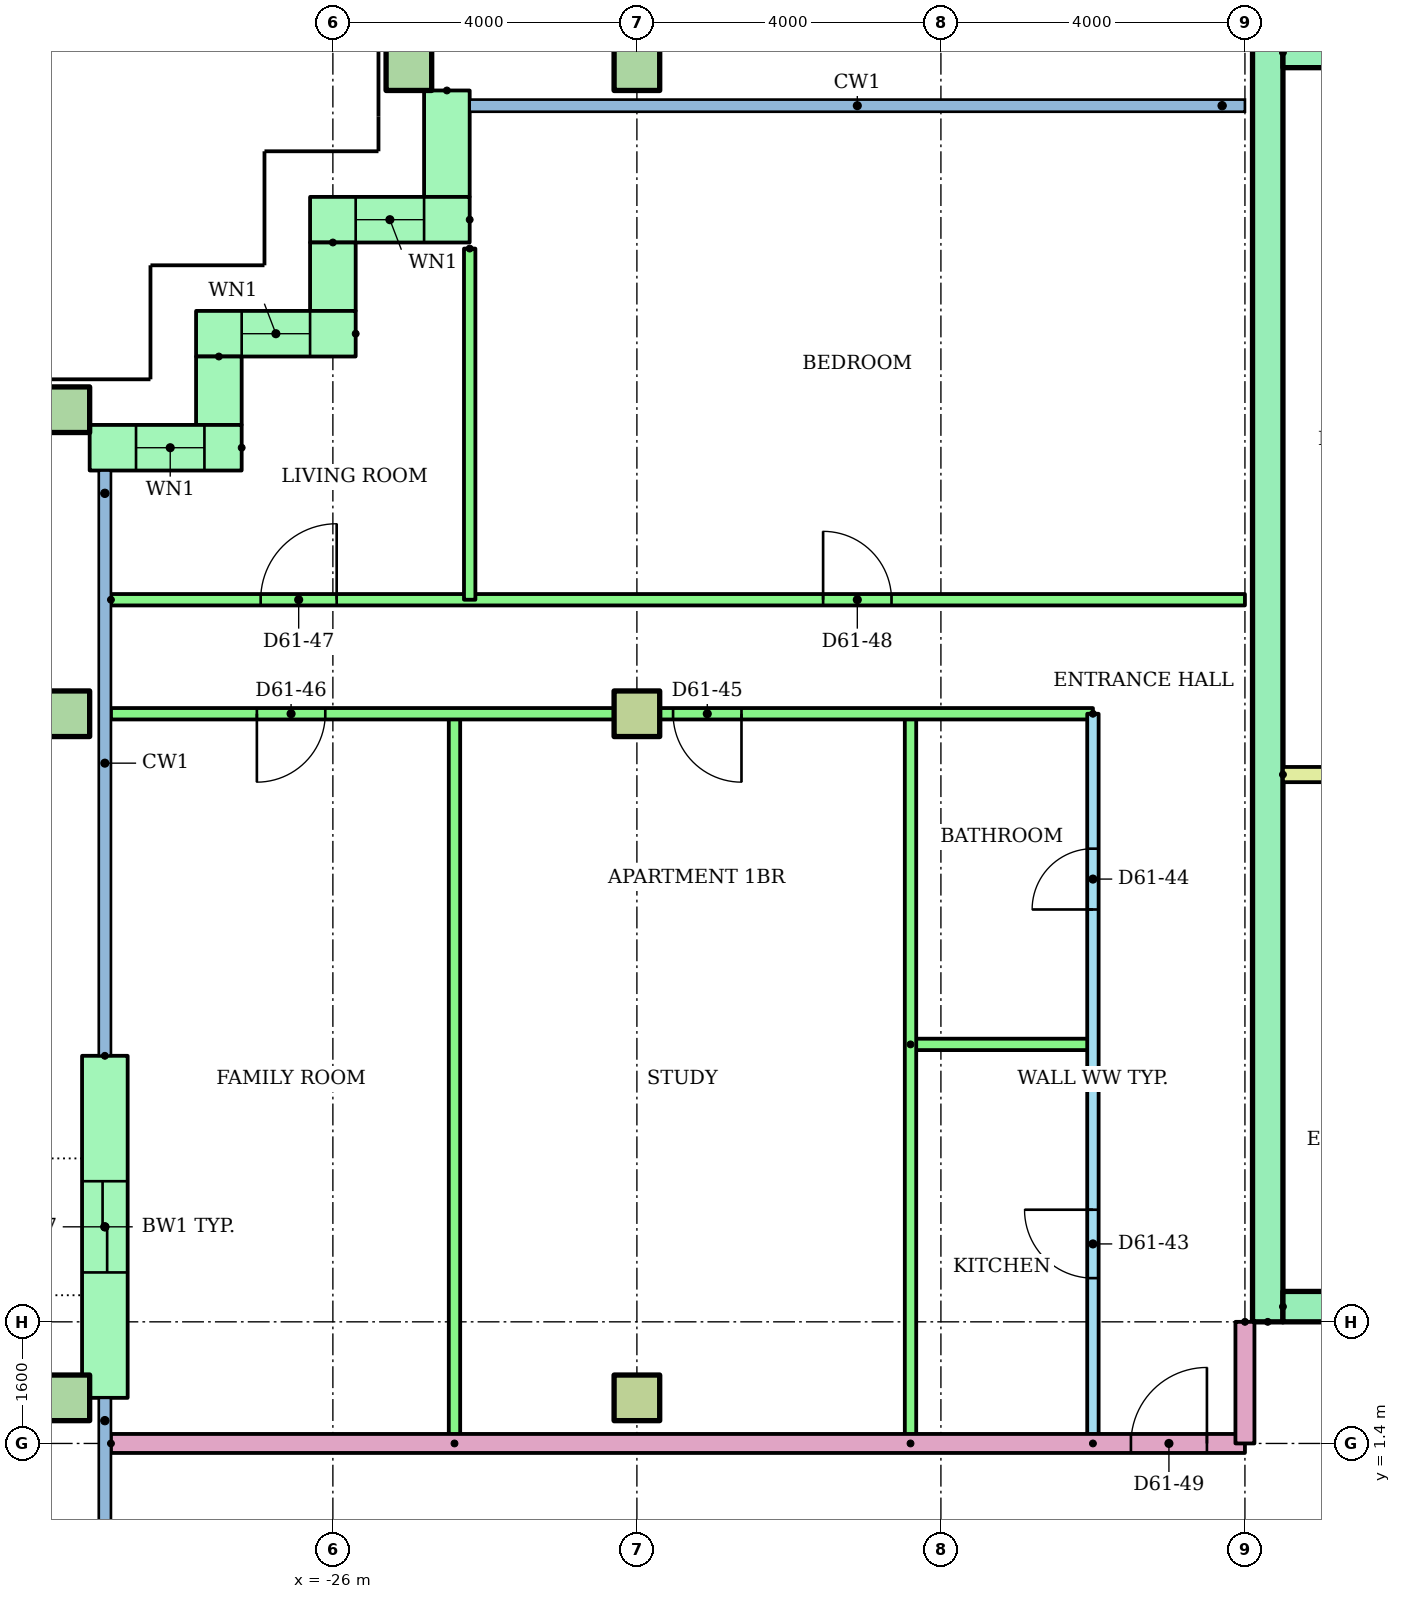
"""IFC4 building model, lengths in metres.
Left out: names, types, materials, properties, quantities, classifications, styles, units other than length and angle.
Written with IfcOpenShell. Run it as: python <this file> out.ifc"""

import sys

from ifc_helpers import new_model, si_unit, direction, frame, frame_2d, origin, origin_2d, place, context, subcontext, project, spatial, rectangle, hollow_rectangle, extrude, element, fill, save


model = new_model("IFC4")
c1 = context("Model", 3, precision=1e-05, world=origin(), true_north=direction((0.0, 1.0)))
c2 = subcontext(c1, "Body", "Model", "MODEL_VIEW")
j1 = project(units=[si_unit("LENGTHUNIT", "METRE"), si_unit("PLANEANGLEUNIT", "RADIAN")], contexts=[c1])
p1 = place(None, origin())
s1 = spatial("IfcSite", under=j1, at=p1, CompositionType="ELEMENT")
p2 = place(p1, origin())
s2 = spatial("IfcBuilding", under=s1, at=p2, CompositionType="ELEMENT")
p3 = place(p2, frame((0.0, 0.0, 233.2)))
s3 = spatial("IfcBuildingStorey", under=s2, at=p3, CompositionType="ELEMENT", Elevation=233.2)
p4 = place(p3, frame((-29.5, 2.0, 0.0)))
e1 = element("IfcColumn", 1, at=p4, inside=s3, PredefinedType="COLUMN", context=c2, shape_type="SweptSolid", body=[
    extrude(hollow_rectangle(XDim=0.6, YDim=0.6, WallThickness=0.03, at=origin_2d()), origin(), (0.0, 0.0, 1.0), 3.2),
])
p5 = place(p3, frame((-22.0, 2.0, 0.0)))
e2 = element("IfcColumn", 2, at=p5, inside=s3, PredefinedType="COLUMN", context=c2, shape_type="SweptSolid", body=[
    extrude(rectangle(XDim=0.6, YDim=0.6, at=origin_2d()), origin(), (0.0, 0.0, 1.0), 3.2),
])
p6 = place(p3, frame((-29.5, 11.0, 0.0)))
e3 = element("IfcColumn", 3, at=p6, inside=s3, PredefinedType="COLUMN", context=c2, shape_type="SweptSolid", body=[
    extrude(hollow_rectangle(XDim=0.6, YDim=0.6, WallThickness=0.03, at=origin_2d()), origin(), (0.0, 0.0, 1.0), 3.2),
])
p7 = place(p3, frame((-22.0, 11.0, 0.0)))
e4 = element("IfcColumn", 4, at=p7, inside=s3, PredefinedType="COLUMN", context=c2, shape_type="SweptSolid", body=[
    extrude(rectangle(XDim=0.6, YDim=0.6, at=origin_2d()), origin(), (0.0, 0.0, 1.0), 3.2),
])
for number, where in (
    (5, (-29.5, 15.0, 0.0)),
    (6, (-25.0, 19.5, 0.0)),
    (7, (-22.0, 19.5, 0.0)),
):
    element("IfcColumn", number, at=place(p3, frame(where)), inside=s3, PredefinedType="COLUMN", context=c2, shape_type="SweptSolid", body=[
        extrude(hollow_rectangle(XDim=0.6, YDim=0.6, WallThickness=0.03, at=origin_2d()), origin(), (0.0, 0.0, 1.0), 3.2),
    ])
p8 = place(p3, frame((-24.5, 19.2, 0.0), z_axis=(0.0, 0.0, 1.0), x_axis=(0.0, -1.0, 0.0)))
e8 = element("IfcWall", 8, at=p8, inside=s3, PredefinedType="STANDARD", context=c2, shape_type="SweptSolid", body=[
    extrude(rectangle(XDim=1.4, YDim=0.6, at=frame_2d((0.7, 0.0))), origin(), (0.0, 0.0, 1.0), 2.92),
])
p9 = place(p3, frame((-24.2, 17.5, 0.0), z_axis=(0.0, 0.0, 1.0), x_axis=(-1.0, 0.0, 0.0)))
e9 = element("IfcWall", 9, at=p9, inside=s3, PredefinedType="STANDARD", context=c2, shape_type="SweptSolid", body=[
    extrude(rectangle(XDim=2.1, YDim=0.6, at=frame_2d((1.05, 0.0))), origin(), (0.0, 0.0, 1.0), 2.92),
])
p10 = place(p9, frame((0.6, 0.0, 0.9)))
e10 = element("IfcOpeningElement", 10, at=p10, cuts=e9, PredefinedType="OPENING", context=c2, shape_type="SweptSolid", body=[
    extrude(rectangle(XDim=0.9, YDim=1.5, at=frame_2d((0.45, 0.75))), frame((0.0, 0.31, 0.0), z_axis=(0.0, -1.0, 0.0), x_axis=(1.0, 0.0, 0.0)), (0.0, 0.0, 1.0), 0.62),
])
p11 = place(p3, frame((-26.0, 17.2, 0.0), z_axis=(0.0, 0.0, 1.0), x_axis=(0.0, -1.0, 0.0)))
e11 = element("IfcWall", 11, at=p11, inside=s3, PredefinedType="STANDARD", context=c2, shape_type="SweptSolid", body=[
    extrude(rectangle(XDim=0.9, YDim=0.6, at=frame_2d((0.45, 0.0))), origin(), (0.0, 0.0, 1.0), 2.92),
])
p12 = place(p3, frame((-25.7, 16.0, 0.0), z_axis=(0.0, 0.0, 1.0), x_axis=(-1.0, 0.0, 0.0)))
e12 = element("IfcWall", 12, at=p12, inside=s3, PredefinedType="STANDARD", context=c2, shape_type="SweptSolid", body=[
    extrude(rectangle(XDim=2.1, YDim=0.6, at=frame_2d((1.05, 0.0))), origin(), (0.0, 0.0, 1.0), 2.92),
])
p13 = place(p12, frame((0.6, 0.0, 0.9)))
e13 = element("IfcOpeningElement", 13, at=p13, cuts=e12, PredefinedType="OPENING", context=c2, shape_type="SweptSolid", body=[
    extrude(rectangle(XDim=0.9, YDim=1.5, at=frame_2d((0.45, 0.75))), frame((0.0, 0.31, 0.0), z_axis=(0.0, -1.0, 0.0), x_axis=(1.0, 0.0, 0.0)), (0.0, 0.0, 1.0), 0.62),
])
p14 = place(p3, frame((-27.5, 15.7, 0.0), z_axis=(0.0, 0.0, 1.0), x_axis=(0.0, -1.0, 0.0)))
e14 = element("IfcWall", 14, at=p14, inside=s3, PredefinedType="STANDARD", context=c2, shape_type="SweptSolid", body=[
    extrude(rectangle(XDim=0.9, YDim=0.6, at=frame_2d((0.45, 0.0))), origin(), (0.0, 0.0, 1.0), 2.92),
])
p15 = place(p3, frame((-27.2, 14.5, 0.0), z_axis=(0.0, 0.0, 1.0), x_axis=(-1.0, 0.0, 0.0)))
e15 = element("IfcWall", 15, at=p15, inside=s3, PredefinedType="STANDARD", context=c2, shape_type="SweptSolid", body=[
    extrude(rectangle(XDim=2.0, YDim=0.6, at=frame_2d((1.0, 0.0))), origin(), (0.0, 0.0, 1.0), 2.92),
])
p16 = place(p15, frame((0.49, 0.0, 0.9)))
e16 = element("IfcOpeningElement", 16, at=p16, cuts=e15, PredefinedType="OPENING", context=c2, shape_type="SweptSolid", body=[
    extrude(rectangle(XDim=0.9, YDim=1.5, at=frame_2d((0.45, 0.75))), frame((0.0, 0.31, 0.0), z_axis=(0.0, -1.0, 0.0), x_axis=(1.0, 0.0, 0.0)), (0.0, 0.0, 1.0), 0.62),
])
p17 = place(p3, frame((-29.0, 6.5, 0.0), z_axis=(0.0, 0.0, 1.0), x_axis=(0.0, -1.0, 0.0)))
e17 = element("IfcWall", 17, at=p17, inside=s3, PredefinedType="STANDARD", context=c2, shape_type="SweptSolid", body=[
    extrude(rectangle(XDim=4.5, YDim=0.6, at=frame_2d((2.25, 0.0))), origin(), (0.0, 0.0, 1.0), 2.92),
])
p18 = place(p17, frame((1.65, 0.0, 0.0)))
e18 = element("IfcOpeningElement", 18, at=p18, cuts=e17, PredefinedType="OPENING", context=c2, shape_type="SweptSolid", body=[
    extrude(rectangle(XDim=1.2, YDim=2.1, at=frame_2d((0.6, 1.05))), frame((0.0, 0.31, 0.0), z_axis=(0.0, -1.0, 0.0), x_axis=(1.0, 0.0, 0.0)), (0.0, 0.0, 1.0), 0.62),
])
p19 = place(p3, frame((-13.7, 3.0, 0.0), z_axis=(0.0, 0.0, 1.0), x_axis=(0.0, 1.0, 0.0)))
e19 = element("IfcWall", 19, at=p19, inside=s3, PredefinedType="SHEAR", context=c2, shape_type="SweptSolid", body=[
    extrude(rectangle(XDim=17.0, YDim=0.4, at=frame_2d((8.5, 0.0))), origin(), (0.0, 0.0, 1.0), 2.92),
])
p20 = place(p3, frame((-13.5, 19.7, 0.0)))
e20 = element("IfcWall", 20, at=p20, inside=s3, PredefinedType="SHEAR", context=c2, shape_type="SweptSolid", body=[
    extrude(rectangle(XDim=27.0, YDim=0.4, at=frame_2d((13.5, 0.0))), origin(), (0.0, 0.0, 1.0), 2.92),
])
p21 = place(p3, frame((-13.5, 3.2, 0.0)))
e21 = element("IfcWall", 21, at=p21, inside=s3, PredefinedType="SHEAR", context=c2, shape_type="SweptSolid", body=[
    extrude(rectangle(XDim=27.0, YDim=0.4, at=frame_2d((13.5, 0.0))), origin(), (0.0, 0.0, 1.0), 2.92),
])
p22 = place(p21, frame((22.083, 0.0, 0.0)))
e22 = element("IfcOpeningElement", 22, at=p22, cuts=e21, PredefinedType="OPENING", context=c2, shape_type="SweptSolid", body=[
    extrude(rectangle(XDim=1.1, YDim=2.1, at=frame_2d((0.55, 1.05))), frame((0.0, 0.21, 0.0), z_axis=(0.0, -1.0, 0.0), x_axis=(1.0, 0.0, 0.0)), (0.0, 0.0, 1.0), 0.42),
])
p23 = place(p21, frame((25.128, 0.0, 0.0)))
e23 = element("IfcOpeningElement", 23, at=p23, cuts=e21, PredefinedType="OPENING", context=c2, shape_type="SweptSolid", body=[
    extrude(rectangle(XDim=1.1, YDim=2.1, at=frame_2d((0.55, 1.05))), frame((0.0, 0.21, 0.0), z_axis=(0.0, -1.0, 0.0), x_axis=(1.0, 0.0, 0.0)), (0.0, 0.0, 1.0), 0.42),
])
p24 = place(p21, frame((12.6, 0.0, 0.0)))
e24 = element("IfcOpeningElement", 24, at=p24, cuts=e21, PredefinedType="OPENING", context=c2, shape_type="SweptSolid", body=[
    extrude(rectangle(XDim=1.8, YDim=2.1, at=frame_2d((0.9, 1.05))), frame((0.0, 0.21, 0.0), z_axis=(0.0, -1.0, 0.0), x_axis=(1.0, 0.0, 0.0)), (0.0, 0.0, 1.0), 0.42),
])
p25 = place(p3, frame((-13.5, 10.2, 0.0)))
e25 = element("IfcWall", 25, at=p25, inside=s3, PredefinedType="PARTITIONING", context=c2, shape_type="SweptSolid", body=[
    extrude(rectangle(XDim=3.9, YDim=0.2, at=frame_2d((1.95, 0.0))), origin(), (0.0, 0.0, 1.0), 2.92),
])
p26 = place(p3, frame((-16.0, 1.4, 0.0), z_axis=(0.0, 0.0, 1.0), x_axis=(0.0, 1.0, 0.0)))
e26 = element("IfcWall", 26, at=p26, inside=s3, PredefinedType="PARTITIONING", context=c2, shape_type="SweptSolid", body=[
    extrude(rectangle(XDim=9.6, YDim=0.15, at=frame_2d((4.8, 0.0))), origin(), (0.0, 0.0, 1.0), 2.4),
])
p27 = place(p26, frame((2.175, 0.0, 0.0)))
e27 = element("IfcOpeningElement", 27, at=p27, cuts=e26, PredefinedType="OPENING", context=c2, shape_type="SweptSolid", body=[
    extrude(rectangle(XDim=0.9, YDim=2.1, at=frame_2d((0.45, 1.05))), frame((0.0, 0.085, 0.0), z_axis=(0.0, -1.0, 0.0), x_axis=(1.0, 0.0, 0.0)), (0.0, 0.0, 1.0), 0.17),
])
p28 = place(p26, frame((7.025, 0.0, 0.0)))
e28 = element("IfcOpeningElement", 28, at=p28, cuts=e26, PredefinedType="OPENING", context=c2, shape_type="SweptSolid", body=[
    extrude(rectangle(XDim=0.8, YDim=2.1, at=frame_2d((0.4, 1.05))), frame((0.0, 0.085, 0.0), z_axis=(0.0, -1.0, 0.0), x_axis=(1.0, 0.0, 0.0)), (0.0, 0.0, 1.0), 0.17),
])
p29 = place(p3, frame((-18.4, 6.65, 0.0)))
e29 = element("IfcWall", 29, at=p29, inside=s3, PredefinedType="PARTITIONING", context=c2, shape_type="SweptSolid", body=[
    extrude(rectangle(XDim=2.4, YDim=0.15, at=frame_2d((1.2, 0.0))), origin(), (0.0, 0.0, 1.0), 2.4),
])
for number, where, z_axis, x_axis in (
    (30, (-18.4, 1.4, 0.0), (0.0, 0.0, 1.0), (0.0, 1.0, 0.0)),
    (31, (-24.4, 1.4, 0.0), (0.0, 0.0, 1.0), (0.0, 1.0, 0.0)),
):
    element("IfcWall", number, at=place(p3, frame(where, z_axis=z_axis, x_axis=x_axis)), inside=s3, PredefinedType="PARTITIONING", context=c2, shape_type="SweptSolid", body=[
        extrude(rectangle(XDim=9.6, YDim=0.15, at=frame_2d((4.8, 0.0))), origin(), (0.0, 0.0, 1.0), 2.4),
    ])
p30 = place(p3, frame((-16.0, 11.0, 0.0), z_axis=(0.0, 0.0, 1.0), x_axis=(-1.0, 0.0, 0.0)))
e32 = element("IfcWall", 32, at=p30, inside=s3, PredefinedType="PARTITIONING", context=c2, shape_type="SweptSolid", body=[
    extrude(rectangle(XDim=12.92, YDim=0.15, at=frame_2d((6.46, 0.0))), origin(), (0.0, 0.0, 1.0), 2.4),
])
p31 = place(p30, frame((4.624, 0.0, 0.0)))
e33 = element("IfcOpeningElement", 33, at=p31, cuts=e32, PredefinedType="OPENING", context=c2, shape_type="SweptSolid", body=[
    extrude(rectangle(XDim=0.9, YDim=2.1, at=frame_2d((0.45, 1.05))), frame((0.0, 0.085, 0.0), z_axis=(0.0, -1.0, 0.0), x_axis=(1.0, 0.0, 0.0)), (0.0, 0.0, 1.0), 0.17),
])
p32 = place(p30, frame((10.1, 0.0, 0.0)))
e34 = element("IfcOpeningElement", 34, at=p32, cuts=e32, PredefinedType="OPENING", context=c2, shape_type="SweptSolid", body=[
    extrude(rectangle(XDim=0.9, YDim=2.1, at=frame_2d((0.45, 1.05))), frame((0.0, 0.085, 0.0), z_axis=(0.0, -1.0, 0.0), x_axis=(1.0, 0.0, 0.0)), (0.0, 0.0, 1.0), 0.17),
])
p33 = place(p3, frame((-28.92, 12.5, 0.0)))
e35 = element("IfcWall", 35, at=p33, inside=s3, PredefinedType="PARTITIONING", context=c2, shape_type="SweptSolid", body=[
    extrude(rectangle(XDim=14.92, YDim=0.15, at=frame_2d((7.46, 0.0))), origin(), (0.0, 0.0, 1.0), 2.4),
])
p34 = place(p33, frame((1.97, 0.0, 0.0)))
e36 = element("IfcOpeningElement", 36, at=p34, cuts=e35, PredefinedType="OPENING", context=c2, shape_type="SweptSolid", body=[
    extrude(rectangle(XDim=1.0, YDim=2.1, at=frame_2d((0.5, 1.05))), frame((0.0, 0.085, 0.0), z_axis=(0.0, -1.0, 0.0), x_axis=(1.0, 0.0, 0.0)), (0.0, 0.0, 1.0), 0.17),
])
p35 = place(p33, frame((9.37, 0.0, 0.0)))
e37 = element("IfcOpeningElement", 37, at=p35, cuts=e35, PredefinedType="OPENING", context=c2, shape_type="SweptSolid", body=[
    extrude(rectangle(XDim=0.9, YDim=2.1, at=frame_2d((0.45, 1.05))), frame((0.0, 0.085, 0.0), z_axis=(0.0, -1.0, 0.0), x_axis=(1.0, 0.0, 0.0)), (0.0, 0.0, 1.0), 0.17),
])
p36 = place(p3, frame((-24.2, 17.12, 0.0), z_axis=(0.0, 0.0, 1.0), x_axis=(0.0, -1.0, 0.0)))
e38 = element("IfcWall", 38, at=p36, inside=s3, PredefinedType="PARTITIONING", context=c2, shape_type="SweptSolid", body=[
    extrude(rectangle(XDim=4.62, YDim=0.15, at=frame_2d((2.31, 0.0))), origin(), (0.0, 0.0, 1.0), 2.4),
])
p37 = place(p3, frame((-28.92, 1.4, 0.0)))
e39 = element("IfcWall", 39, at=p37, inside=s3, PredefinedType="PARTITIONING", context=c2, shape_type="SweptSolid", body=[
    extrude(rectangle(XDim=14.92, YDim=0.25, at=frame_2d((7.46, 0.0))), origin(), (0.0, 0.0, 1.0), 2.4),
])
p38 = place(p37, frame((13.42, 0.0, 0.0)))
e40 = element("IfcOpeningElement", 40, at=p38, cuts=e39, PredefinedType="OPENING", context=c2, shape_type="SweptSolid", body=[
    extrude(rectangle(XDim=1.0, YDim=2.1, at=frame_2d((0.5, 1.05))), frame((0.0, 0.135, 0.0), z_axis=(0.0, -1.0, 0.0), x_axis=(1.0, 0.0, 0.0)), (0.0, 0.0, 1.0), 0.27),
])
p39 = place(p3, frame((-14.0, 3.0, 0.0), z_axis=(0.0, 0.0, 1.0), x_axis=(0.0, -1.0, 0.0)))
e41 = element("IfcWall", 41, at=p39, inside=s3, PredefinedType="PARTITIONING", context=c2, shape_type="SweptSolid", body=[
    extrude(rectangle(XDim=1.6, YDim=0.25, at=frame_2d((0.8, 0.0))), origin(), (0.0, 0.0, 1.0), 2.4),
])
p40 = place(p10, origin())
e42 = element("IfcWindow", 42, at=p40, inside=s3, PartitioningType="SINGLE_PANEL", PredefinedType="WINDOW", context=c2, shape_type="SweptSolid", body=[
    extrude(rectangle(XDim=0.9, YDim=1.5, at=frame_2d((0.45, 0.75))), frame((0.0, 0.03, 0.0), z_axis=(0.0, -1.0, 0.0), x_axis=(1.0, 0.0, 0.0)), (0.0, 0.0, 1.0), 0.06),
])
fill(e10, e42)
p41 = place(p13, origin())
e43 = element("IfcWindow", 43, at=p41, inside=s3, PartitioningType="SINGLE_PANEL", PredefinedType="WINDOW", context=c2, shape_type="SweptSolid", body=[
    extrude(rectangle(XDim=0.9, YDim=1.5, at=frame_2d((0.45, 0.75))), frame((0.0, 0.03, 0.0), z_axis=(0.0, -1.0, 0.0), x_axis=(1.0, 0.0, 0.0)), (0.0, 0.0, 1.0), 0.06),
])
fill(e13, e43)
p42 = place(p16, origin())
e44 = element("IfcWindow", 44, at=p42, inside=s3, PartitioningType="SINGLE_PANEL", PredefinedType="WINDOW", context=c2, shape_type="SweptSolid", body=[
    extrude(rectangle(XDim=0.9, YDim=1.5, at=frame_2d((0.45, 0.75))), frame((0.0, 0.03, 0.0), z_axis=(0.0, -1.0, 0.0), x_axis=(1.0, 0.0, 0.0)), (0.0, 0.0, 1.0), 0.06),
])
fill(e16, e44)
p43 = place(p27, origin())
e45 = element("IfcDoor", 45, at=p43, inside=s3, OperationType="SINGLE_SWING_RIGHT", PredefinedType="DOOR", context=c2, shape_type="SweptSolid", body=[
    extrude(rectangle(XDim=0.9, YDim=2.1, at=frame_2d((0.45, 1.05))), frame((0.0, 0.025, 0.0), z_axis=(0.0, -1.0, 0.0), x_axis=(1.0, 0.0, 0.0)), (0.0, 0.0, 1.0), 0.05),
])
fill(e27, e45)
p44 = place(p28, origin())
e46 = element("IfcDoor", 46, at=p44, inside=s3, OperationType="SINGLE_SWING_LEFT", PredefinedType="DOOR", context=c2, shape_type="SweptSolid", body=[
    extrude(rectangle(XDim=0.8, YDim=2.1, at=frame_2d((0.4, 1.05))), frame((0.0, 0.025, 0.0), z_axis=(0.0, -1.0, 0.0), x_axis=(1.0, 0.0, 0.0)), (0.0, 0.0, 1.0), 0.05),
])
fill(e28, e46)
p45 = place(p31, origin())
e47 = element("IfcDoor", 47, at=p45, inside=s3, OperationType="SINGLE_SWING_LEFT", PredefinedType="DOOR", context=c2, shape_type="SweptSolid", body=[
    extrude(rectangle(XDim=0.9, YDim=2.1, at=frame_2d((0.45, 1.05))), frame((0.0, 0.025, 0.0), z_axis=(0.0, -1.0, 0.0), x_axis=(1.0, 0.0, 0.0)), (0.0, 0.0, 1.0), 0.05),
])
fill(e33, e47)
p46 = place(p32, origin())
e48 = element("IfcDoor", 48, at=p46, inside=s3, OperationType="SINGLE_SWING_RIGHT", PredefinedType="DOOR", context=c2, shape_type="SweptSolid", body=[
    extrude(rectangle(XDim=0.9, YDim=2.1, at=frame_2d((0.45, 1.05))), frame((0.0, 0.025, 0.0), z_axis=(0.0, -1.0, 0.0), x_axis=(1.0, 0.0, 0.0)), (0.0, 0.0, 1.0), 0.05),
])
fill(e34, e48)
p47 = place(p34, origin())
e49 = element("IfcDoor", 49, at=p47, inside=s3, OperationType="SINGLE_SWING_RIGHT", PredefinedType="DOOR", context=c2, shape_type="SweptSolid", body=[
    extrude(rectangle(XDim=1.0, YDim=2.1, at=frame_2d((0.5, 1.05))), frame((0.0, 0.025, 0.0), z_axis=(0.0, -1.0, 0.0), x_axis=(1.0, 0.0, 0.0)), (0.0, 0.0, 1.0), 0.05),
])
fill(e36, e49)
p48 = place(p35, origin())
e50 = element("IfcDoor", 50, at=p48, inside=s3, OperationType="SINGLE_SWING_LEFT", PredefinedType="DOOR", context=c2, shape_type="SweptSolid", body=[
    extrude(rectangle(XDim=0.9, YDim=2.1, at=frame_2d((0.45, 1.05))), frame((0.0, 0.025, 0.0), z_axis=(0.0, -1.0, 0.0), x_axis=(1.0, 0.0, 0.0)), (0.0, 0.0, 1.0), 0.05),
])
fill(e37, e50)
p49 = place(p38, origin())
e51 = element("IfcDoor", 51, at=p49, inside=s3, OperationType="SINGLE_SWING_RIGHT", PredefinedType="DOOR", context=c2, shape_type="SweptSolid", body=[
    extrude(rectangle(XDim=1.0, YDim=2.1, at=frame_2d((0.5, 1.05))), frame((0.0, 0.025, 0.0), z_axis=(0.0, -1.0, 0.0), x_axis=(1.0, 0.0, 0.0)), (0.0, 0.0, 1.0), 0.05),
])
fill(e40, e51)
p50 = place(p18, origin())
e52 = element("IfcDoor", 52, at=p50, inside=s3, OperationType="SLIDING_TO_LEFT", PredefinedType="DOOR", context=c2, shape_type="SweptSolid", body=[
    extrude(rectangle(XDim=1.2, YDim=2.1, at=frame_2d((0.6, 1.05))), frame((0.0, 0.025, 0.0), z_axis=(0.0, -1.0, 0.0), x_axis=(1.0, 0.0, 0.0)), (0.0, 0.0, 1.0), 0.05),
])
fill(e18, e52)
save(model, sys.argv[1])
